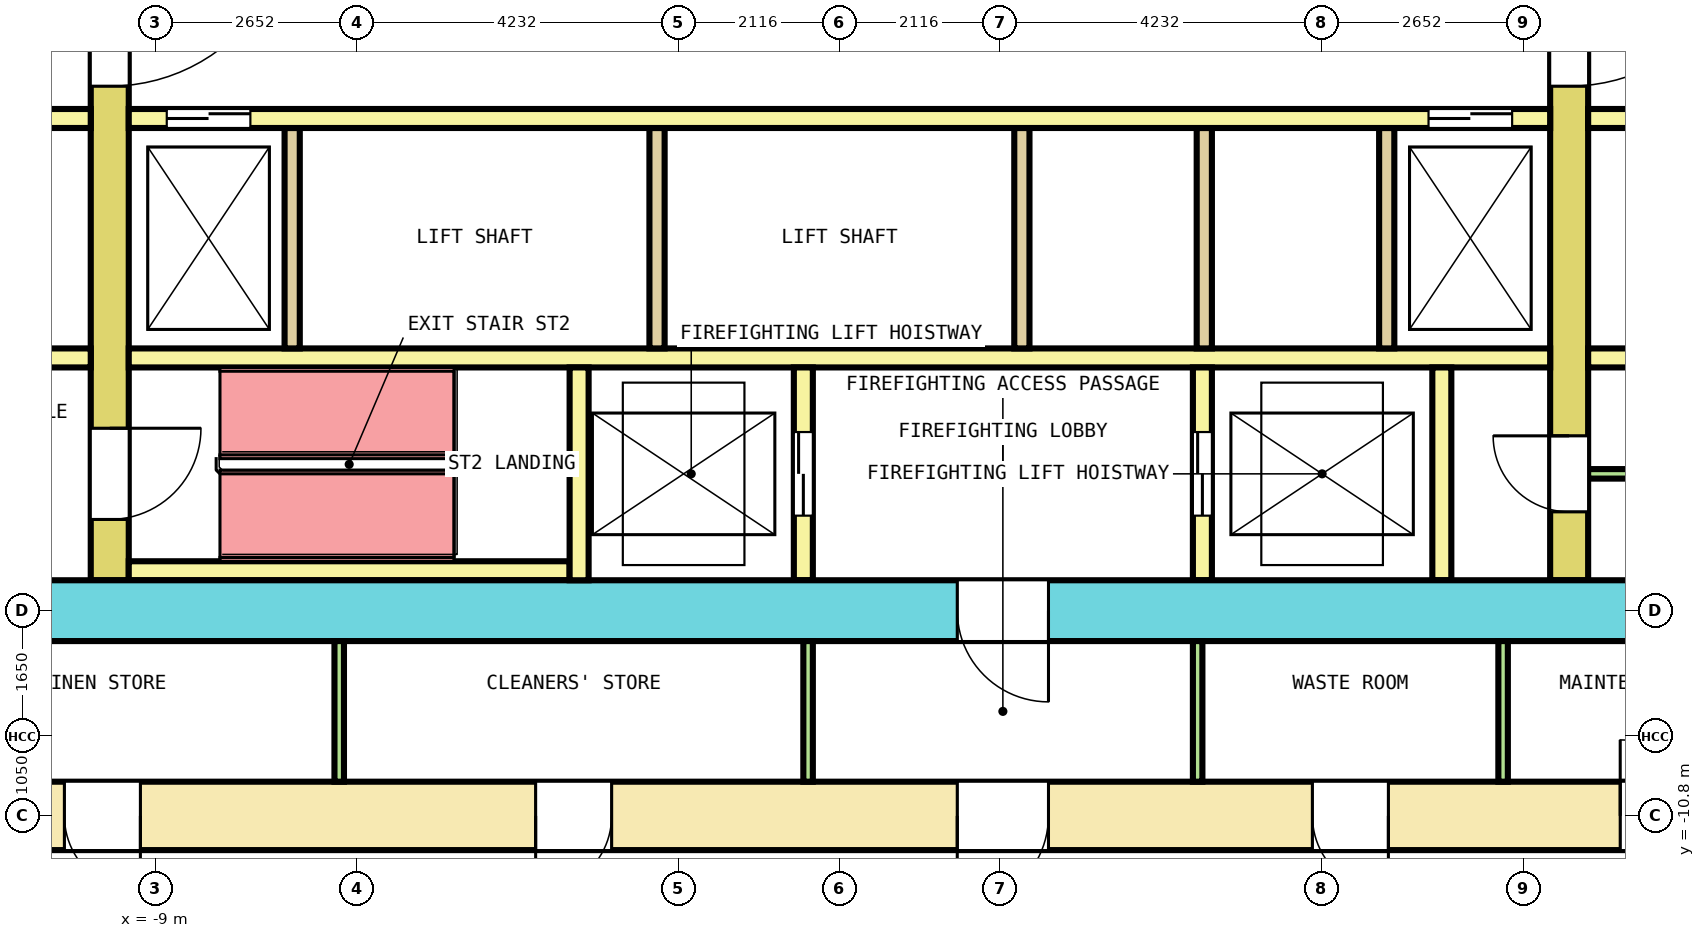
"""IFC4 building model, lengths in metres.
Left out: names, types, materials, properties, quantities, classifications, styles, units other than length and angle.
Written with IfcOpenShell. Run it as: python <this file> out.ifc"""

import sys

from ifc_helpers import new_model, si_unit, direction, frame, frame_2d, origin, place, context, subcontext, project, spatial, rectangle, extrude, element, fill, save


model = new_model("IFC4")
c1 = context("Model", 3, precision=1e-05, world=origin(), true_north=direction((0.0, 1.0)))
c2 = subcontext(c1, "Body", "Model", "MODEL_VIEW")
j1 = project(units=[si_unit("LENGTHUNIT", "METRE"), si_unit("PLANEANGLEUNIT", "RADIAN")], contexts=[c1])
p1 = place(None, origin())
s1 = spatial("IfcSite", under=j1, at=p1, CompositionType="ELEMENT")
p2 = place(p1, origin())
s2 = spatial("IfcBuilding", under=s1, at=p2, CompositionType="ELEMENT")
p3 = place(p2, frame((0.0, 0.0, 32.2)))
s3 = spatial("IfcBuildingStorey", under=s2, at=p3, CompositionType="ELEMENT", Elevation=32.2)
p4 = place(p3, frame((-13.65, -10.8, 0.0), z_axis=(0.0, 0.0, 1.0), x_axis=(1.0, 0.0, 0.0)))
e1 = element("IfcWall", 1, at=p4, inside=s3, PredefinedType="SHEAR", context=c2, shape_type="SweptSolid", body=[
    extrude(rectangle(XDim=27.3, YDim=0.9, at=frame_2d((13.65, 0.0))), origin(), (0.0, 0.0, 1.0), 4.1),
])
p5 = place(p4, frame((3.453, 0.0, 0.0)))
e2 = element("IfcOpeningElement", 2, at=p5, cuts=e1, PredefinedType="OPENING", context=c2, shape_type="SweptSolid", body=[
    extrude(rectangle(XDim=1.0, YDim=2.1, at=frame_2d((0.5, 1.05))), frame((0.0, 0.46, 0.0), z_axis=(0.0, -1.0, 0.0), x_axis=(1.0, 0.0, 0.0)), (0.0, 0.0, 1.0), 0.92),
])
p6 = place(p4, frame((9.653, 0.0, 0.0)))
e3 = element("IfcOpeningElement", 3, at=p6, cuts=e1, PredefinedType="OPENING", context=c2, shape_type="SweptSolid", body=[
    extrude(rectangle(XDim=1.0, YDim=2.1, at=frame_2d((0.5, 1.05))), frame((0.0, 0.46, 0.0), z_axis=(0.0, -1.0, 0.0), x_axis=(1.0, 0.0, 0.0)), (0.0, 0.0, 1.0), 0.92),
])
p7 = place(p4, frame((19.872, 0.0, 0.0)))
e4 = element("IfcOpeningElement", 4, at=p7, cuts=e1, PredefinedType="OPENING", context=c2, shape_type="SweptSolid", body=[
    extrude(rectangle(XDim=1.0, YDim=2.1, at=frame_2d((0.5, 1.05))), frame((0.0, 0.46, 0.0), z_axis=(0.0, -1.0, 0.0), x_axis=(1.0, 0.0, 0.0)), (0.0, 0.0, 1.0), 0.92),
])
p8 = place(p4, frame((23.922, 0.0, 0.0)))
e5 = element("IfcOpeningElement", 5, at=p8, cuts=e1, PredefinedType="OPENING", context=c2, shape_type="SweptSolid", body=[
    extrude(rectangle(XDim=1.0, YDim=2.1, at=frame_2d((0.5, 1.05))), frame((0.0, 0.46, 0.0), z_axis=(0.0, -1.0, 0.0), x_axis=(1.0, 0.0, 0.0)), (0.0, 0.0, 1.0), 0.92),
])
p9 = place(p4, frame((15.2, 0.0, 0.0)))
e6 = element("IfcOpeningElement", 6, at=p9, cuts=e1, PredefinedType="OPENING", context=c2, shape_type="SweptSolid", body=[
    extrude(rectangle(XDim=1.2, YDim=2.1, at=frame_2d((0.6, 1.05))), frame((0.0, 0.46, 0.0), z_axis=(0.0, -1.0, 0.0), x_axis=(1.0, 0.0, 0.0)), (0.0, 0.0, 1.0), 0.92),
])
p10 = place(p3, frame((-12.75, -8.1, 0.0), z_axis=(0.0, 0.0, 1.0), x_axis=(1.0, 0.0, 0.0)))
e7 = element("IfcWall", 7, at=p10, inside=s3, PredefinedType="SHEAR", context=c2, shape_type="SweptSolid", body=[
    extrude(rectangle(XDim=25.5, YDim=0.8, at=frame_2d((12.75, 0.0))), origin(), (0.0, 0.0, 1.0), 4.1),
])
p11 = place(p10, frame((14.3, 0.0, 0.0)))
e8 = element("IfcOpeningElement", 8, at=p11, cuts=e7, PredefinedType="OPENING", context=c2, shape_type="SweptSolid", body=[
    extrude(rectangle(XDim=1.2, YDim=2.1, at=frame_2d((0.6, 1.05))), frame((0.0, 0.41, 0.0), z_axis=(0.0, -1.0, 0.0), x_axis=(1.0, 0.0, 0.0)), (0.0, 0.0, 1.0), 0.82),
])
p12 = place(p3, frame((-9.6, -7.7, 0.0), z_axis=(0.0, 0.0, 1.0), x_axis=(0.0, 1.0, 0.0)))
e9 = element("IfcWall", 9, at=p12, inside=s3, PredefinedType="SHEAR", context=c2, shape_type="SweptSolid", body=[
    extrude(rectangle(XDim=15.4, YDim=0.5, at=frame_2d((7.7, 0.0))), origin(), (0.0, 0.0, 1.0), 4.1),
])
p13 = place(p12, frame((6.5, 0.0, 0.0)))
e10 = element("IfcOpeningElement", 10, at=p13, cuts=e9, PredefinedType="OPENING", context=c2, shape_type="SweptSolid", body=[
    extrude(rectangle(XDim=2.4, YDim=2.1, at=frame_2d((1.2, 1.05))), frame((0.0, 0.26, 0.0), z_axis=(0.0, -1.0, 0.0), x_axis=(1.0, 0.0, 0.0)), (0.0, 0.0, 1.0), 0.52),
])
p14 = place(p12, frame((13.4, 0.0, 0.0)))
e11 = element("IfcOpeningElement", 11, at=p14, cuts=e9, PredefinedType="OPENING", context=c2, shape_type="SweptSolid", body=[
    extrude(rectangle(XDim=1.2, YDim=2.1, at=frame_2d((0.6, 1.05))), frame((0.0, 0.26, 0.0), z_axis=(0.0, -1.0, 0.0), x_axis=(1.0, 0.0, 0.0)), (0.0, 0.0, 1.0), 0.52),
])
p15 = place(p12, frame((0.8, 0.0, 0.0)))
e12 = element("IfcOpeningElement", 12, at=p15, cuts=e9, PredefinedType="OPENING", context=c2, shape_type="SweptSolid", body=[
    extrude(rectangle(XDim=1.2, YDim=2.1, at=frame_2d((0.6, 1.05))), frame((0.0, 0.26, 0.0), z_axis=(0.0, -1.0, 0.0), x_axis=(1.0, 0.0, 0.0)), (0.0, 0.0, 1.0), 0.52),
])
p16 = place(p3, frame((9.6, -7.7, 0.0), z_axis=(0.0, 0.0, 1.0), x_axis=(0.0, 1.0, 0.0)))
e13 = element("IfcWall", 13, at=p16, inside=s3, PredefinedType="SHEAR", context=c2, shape_type="SweptSolid", body=[
    extrude(rectangle(XDim=15.4, YDim=0.5, at=frame_2d((7.7, 0.0))), origin(), (0.0, 0.0, 1.0), 4.1),
])
p17 = place(p16, frame((6.5, 0.0, 0.0)))
e14 = element("IfcOpeningElement", 14, at=p17, cuts=e13, PredefinedType="OPENING", context=c2, shape_type="SweptSolid", body=[
    extrude(rectangle(XDim=2.4, YDim=2.1, at=frame_2d((1.2, 1.05))), frame((0.0, 0.26, 0.0), z_axis=(0.0, -1.0, 0.0), x_axis=(1.0, 0.0, 0.0)), (0.0, 0.0, 1.0), 0.52),
])
p18 = place(p16, frame((13.4, 0.0, 0.0)))
e15 = element("IfcOpeningElement", 15, at=p18, cuts=e13, PredefinedType="OPENING", context=c2, shape_type="SweptSolid", body=[
    extrude(rectangle(XDim=1.2, YDim=2.1, at=frame_2d((0.6, 1.05))), frame((0.0, 0.26, 0.0), z_axis=(0.0, -1.0, 0.0), x_axis=(1.0, 0.0, 0.0)), (0.0, 0.0, 1.0), 0.52),
])
p19 = place(p16, frame((0.9, 0.0, 0.0)))
e16 = element("IfcOpeningElement", 16, at=p19, cuts=e13, PredefinedType="OPENING", context=c2, shape_type="SweptSolid", body=[
    extrude(rectangle(XDim=1.0, YDim=2.1, at=frame_2d((0.5, 1.05))), frame((0.0, 0.26, 0.0), z_axis=(0.0, -1.0, 0.0), x_axis=(1.0, 0.0, 0.0)), (0.0, 0.0, 1.0), 0.52),
])
p20 = place(p3, frame((-12.75, -1.625, 0.0), z_axis=(0.0, 0.0, 1.0), x_axis=(1.0, 0.0, 0.0)))
e17 = element("IfcWall", 17, at=p20, inside=s3, PredefinedType="SOLIDWALL", context=c2, shape_type="SweptSolid", body=[
    extrude(rectangle(XDim=2.9, YDim=0.25, at=frame_2d((1.45, 0.0))), origin(), (0.0, 0.0, 1.0), 4.1),
])
p21 = place(p20, frame((0.9, 0.0, 0.0)))
e18 = element("IfcOpeningElement", 18, at=p21, cuts=e17, PredefinedType="OPENING", context=c2, shape_type="SweptSolid", body=[
    extrude(rectangle(XDim=1.1, YDim=2.1, at=frame_2d((0.55, 1.05))), frame((0.0, 0.135, 0.0), z_axis=(0.0, -1.0, 0.0), x_axis=(1.0, 0.0, 0.0)), (0.0, 0.0, 1.0), 0.27),
])
p22 = place(p3, frame((-9.35, -1.625, 0.0), z_axis=(0.0, 0.0, 1.0), x_axis=(1.0, 0.0, 0.0)))
e19 = element("IfcWall", 19, at=p22, inside=s3, PredefinedType="SOLIDWALL", context=c2, shape_type="SweptSolid", body=[
    extrude(rectangle(XDim=18.7, YDim=0.25, at=frame_2d((9.35, 0.0))), origin(), (0.0, 0.0, 1.0), 4.1),
])
p23 = place(p22, frame((0.5, 0.0, 0.0)))
e20 = element("IfcOpeningElement", 20, at=p23, cuts=e19, PredefinedType="OPENING", context=c2, shape_type="SweptSolid", body=[
    extrude(rectangle(XDim=1.1, YDim=2.1, at=frame_2d((0.55, 1.05))), frame((0.0, 0.135, 0.0), z_axis=(0.0, -1.0, 0.0), x_axis=(1.0, 0.0, 0.0)), (0.0, 0.0, 1.0), 0.27),
])
p24 = place(p22, frame((17.1, 0.0, 0.0)))
e21 = element("IfcOpeningElement", 21, at=p24, cuts=e19, PredefinedType="OPENING", context=c2, shape_type="SweptSolid", body=[
    extrude(rectangle(XDim=1.1, YDim=2.1, at=frame_2d((0.55, 1.05))), frame((0.0, 0.135, 0.0), z_axis=(0.0, -1.0, 0.0), x_axis=(1.0, 0.0, 0.0)), (0.0, 0.0, 1.0), 0.27),
])
p25 = place(p3, frame((9.85, -1.625, 0.0), z_axis=(0.0, 0.0, 1.0), x_axis=(1.0, 0.0, 0.0)))
e22 = element("IfcWall", 22, at=p25, inside=s3, PredefinedType="SOLIDWALL", context=c2, shape_type="SweptSolid", body=[
    extrude(rectangle(XDim=2.9, YDim=0.25, at=frame_2d((1.45, 0.0))), origin(), (0.0, 0.0, 1.0), 4.1),
])
p26 = place(p25, frame((0.9, 0.0, 0.0)))
e23 = element("IfcOpeningElement", 23, at=p26, cuts=e22, PredefinedType="OPENING", context=c2, shape_type="SweptSolid", body=[
    extrude(rectangle(XDim=1.1, YDim=2.1, at=frame_2d((0.55, 1.05))), frame((0.0, 0.135, 0.0), z_axis=(0.0, -1.0, 0.0), x_axis=(1.0, 0.0, 0.0)), (0.0, 0.0, 1.0), 0.27),
])
p27 = place(p3, frame((-12.75, -4.775, 0.0), z_axis=(0.0, 0.0, 1.0), x_axis=(1.0, 0.0, 0.0)))
e24 = element("IfcWall", 24, at=p27, inside=s3, PredefinedType="SOLIDWALL", context=c2, shape_type="SweptSolid", body=[
    extrude(rectangle(XDim=2.9, YDim=0.25, at=frame_2d((1.45, 0.0))), origin(), (0.0, 0.0, 1.0), 4.1),
])
p28 = place(p3, frame((-9.35, -4.775, 0.0), z_axis=(0.0, 0.0, 1.0), x_axis=(1.0, 0.0, 0.0)))
e25 = element("IfcWall", 25, at=p28, inside=s3, PredefinedType="SOLIDWALL", context=c2, shape_type="SweptSolid", body=[
    extrude(rectangle(XDim=18.7, YDim=0.25, at=frame_2d((9.35, 0.0))), origin(), (0.0, 0.0, 1.0), 4.1),
])
p29 = place(p3, frame((9.85, -4.775, 0.0), z_axis=(0.0, 0.0, 1.0), x_axis=(1.0, 0.0, 0.0)))
e26 = element("IfcWall", 26, at=p29, inside=s3, PredefinedType="SOLIDWALL", context=c2, shape_type="SweptSolid", body=[
    extrude(rectangle(XDim=2.9, YDim=0.25, at=frame_2d((1.45, 0.0))), origin(), (0.0, 0.0, 1.0), 4.1),
])
for number, where, z_axis, x_axis in (
    (27, (-7.2, -4.65, 0.0), (0.0, 0.0, 1.0), (0.0, 1.0, 0.0)),
    (28, (-2.4, -4.65, 0.0), (0.0, 0.0, 1.0), (0.0, 1.0, 0.0)),
    (29, (2.4, -4.65, 0.0), (0.0, 0.0, 1.0), (0.0, 1.0, 0.0)),
    (30, (4.8, -4.65, 0.0), (0.0, 0.0, 1.0), (0.0, 1.0, 0.0)),
    (31, (7.2, -4.65, 0.0), (0.0, 0.0, 1.0), (0.0, 1.0, 0.0)),
):
    element("IfcWall", number, at=place(p3, frame(where, z_axis=z_axis, x_axis=x_axis)), inside=s3, PredefinedType="SOLIDWALL", context=c2, shape_type="SweptSolid", body=[
        extrude(rectangle(XDim=2.9, YDim=0.2, at=frame_2d((1.45, 0.0))), origin(), (0.0, 0.0, 1.0), 4.1),
    ])
p30 = place(p3, frame((-9.35, -7.575, 0.0), z_axis=(0.0, 0.0, 1.0), x_axis=(1.0, 0.0, 0.0)))
e32 = element("IfcWall", 32, at=p30, inside=s3, PredefinedType="SOLIDWALL", context=c2, shape_type="SweptSolid", body=[
    extrude(rectangle(XDim=5.8, YDim=0.25, at=frame_2d((2.9, 0.0))), origin(), (0.0, 0.0, 1.0), 4.1),
])
p31 = place(p3, frame((-3.425, -7.7, 0.0), z_axis=(0.0, 0.0, 1.0), x_axis=(0.0, 1.0, 0.0)))
e33 = element("IfcWall", 33, at=p31, inside=s3, PredefinedType="SOLIDWALL", context=c2, shape_type="SweptSolid", body=[
    extrude(rectangle(XDim=2.8, YDim=0.25, at=frame_2d((1.4, 0.0))), origin(), (0.0, 0.0, 1.0), 4.1),
])
p32 = place(p3, frame((-0.475, -7.7, 0.0), z_axis=(0.0, 0.0, 1.0), x_axis=(0.0, 1.0, 0.0)))
e34 = element("IfcWall", 34, at=p32, inside=s3, PredefinedType="SOLIDWALL", context=c2, shape_type="SweptSolid", body=[
    extrude(rectangle(XDim=2.8, YDim=0.25, at=frame_2d((1.4, 0.0))), origin(), (0.0, 0.0, 1.0), 4.1),
])
p33 = place(p32, frame((0.85, 0.0, 0.0)))
e35 = element("IfcOpeningElement", 35, at=p33, cuts=e34, PredefinedType="OPENING", context=c2, shape_type="SweptSolid", body=[
    extrude(rectangle(XDim=1.1, YDim=2.1, at=frame_2d((0.55, 1.05))), frame((0.0, 0.135, 0.0), z_axis=(0.0, -1.0, 0.0), x_axis=(1.0, 0.0, 0.0)), (0.0, 0.0, 1.0), 0.27),
])
p34 = place(p3, frame((4.775, -7.7, 0.0), z_axis=(0.0, 0.0, 1.0), x_axis=(0.0, 1.0, 0.0)))
e36 = element("IfcWall", 36, at=p34, inside=s3, PredefinedType="SOLIDWALL", context=c2, shape_type="SweptSolid", body=[
    extrude(rectangle(XDim=2.8, YDim=0.25, at=frame_2d((1.4, 0.0))), origin(), (0.0, 0.0, 1.0), 4.1),
])
p35 = place(p34, frame((0.85, 0.0, 0.0)))
e37 = element("IfcOpeningElement", 37, at=p35, cuts=e36, PredefinedType="OPENING", context=c2, shape_type="SweptSolid", body=[
    extrude(rectangle(XDim=1.1, YDim=2.1, at=frame_2d((0.55, 1.05))), frame((0.0, 0.135, 0.0), z_axis=(0.0, -1.0, 0.0), x_axis=(1.0, 0.0, 0.0)), (0.0, 0.0, 1.0), 0.27),
])
p36 = place(p3, frame((7.925, -7.7, 0.0), z_axis=(0.0, 0.0, 1.0), x_axis=(0.0, 1.0, 0.0)))
e38 = element("IfcWall", 38, at=p36, inside=s3, PredefinedType="SOLIDWALL", context=c2, shape_type="SweptSolid", body=[
    extrude(rectangle(XDim=2.8, YDim=0.25, at=frame_2d((1.4, 0.0))), origin(), (0.0, 0.0, 1.0), 4.1),
])
p37 = place(p3, frame((9.85, -6.3, 0.0), z_axis=(0.0, 0.0, 1.0), x_axis=(1.0, 0.0, 0.0)))
e39 = element("IfcWall", 39, at=p37, inside=s3, PredefinedType="PARTITIONING", context=c2, shape_type="SweptSolid", body=[
    extrude(rectangle(XDim=2.9, YDim=0.125, at=frame_2d((1.45, 0.0))), origin(), (0.0, 0.0, 1.0), 4.1),
])
for number, where, z_axis, x_axis in (
    (40, (-6.581, -10.35, 0.0), (0.0, 0.0, 1.0), (0.0, 1.0, 0.0)),
    (41, (-0.413, -10.35, 0.0), (0.0, 0.0, 1.0), (0.0, 1.0, 0.0)),
    (42, (4.712, -10.35, 0.0), (0.0, 0.0, 1.0), (0.0, 1.0, 0.0)),
    (43, (8.731, -10.35, 0.0), (0.0, 0.0, 1.0), (0.0, 1.0, 0.0)),
):
    element("IfcWall", number, at=place(p3, frame(where, z_axis=z_axis, x_axis=x_axis)), inside=s3, PredefinedType="PARTITIONING", context=c2, shape_type="SweptSolid", body=[
        extrude(rectangle(XDim=1.85, YDim=0.125, at=frame_2d((0.925, 0.0))), origin(), (0.0, 0.0, 1.0), 4.1),
    ])
p38 = place(p23, origin())
e44 = element("IfcDoor", 44, at=p38, inside=s3, OperationType="DOUBLE_DOOR_SLIDING", PredefinedType="DOOR", context=c2, shape_type="SweptSolid", body=[
    extrude(rectangle(XDim=1.1, YDim=2.1, at=frame_2d((0.55, 1.05))), frame((0.0, 0.075, 0.0), z_axis=(0.0, -1.0, 0.0), x_axis=(1.0, 0.0, 0.0)), (0.0, 0.0, 1.0), 0.15),
])
fill(e20, e44)
p39 = place(p24, origin())
e45 = element("IfcDoor", 45, at=p39, inside=s3, OperationType="DOUBLE_DOOR_SLIDING", PredefinedType="DOOR", context=c2, shape_type="SweptSolid", body=[
    extrude(rectangle(XDim=1.1, YDim=2.1, at=frame_2d((0.55, 1.05))), frame((0.0, 0.075, 0.0), z_axis=(0.0, -1.0, 0.0), x_axis=(1.0, 0.0, 0.0)), (0.0, 0.0, 1.0), 0.15),
])
fill(e21, e45)
p40 = place(p33, origin())
e46 = element("IfcDoor", 46, at=p40, inside=s3, OperationType="DOUBLE_DOOR_SLIDING", PredefinedType="DOOR", context=c2, shape_type="SweptSolid", body=[
    extrude(rectangle(XDim=1.1, YDim=2.1, at=frame_2d((0.55, 1.05))), frame((0.0, 0.075, 0.0), z_axis=(0.0, -1.0, 0.0), x_axis=(1.0, 0.0, 0.0)), (0.0, 0.0, 1.0), 0.15),
])
fill(e35, e46)
p41 = place(p35, origin())
e47 = element("IfcDoor", 47, at=p41, inside=s3, OperationType="DOUBLE_DOOR_SLIDING", PredefinedType="DOOR", context=c2, shape_type="SweptSolid", body=[
    extrude(rectangle(XDim=1.1, YDim=2.1, at=frame_2d((0.55, 1.05))), frame((0.0, 0.075, 0.0), z_axis=(0.0, -1.0, 0.0), x_axis=(1.0, 0.0, 0.0)), (0.0, 0.0, 1.0), 0.15),
])
fill(e37, e47)
p42 = place(p13, origin())
e48 = element("IfcDoor", 48, at=p42, inside=s3, OperationType="DOUBLE_DOOR_SINGLE_SWING", PredefinedType="DOOR", context=c2, shape_type="SweptSolid", body=[
    extrude(rectangle(XDim=2.4, YDim=2.1, at=frame_2d((1.2, 1.05))), frame((0.0, 0.2, 0.0), z_axis=(0.0, -1.0, 0.0), x_axis=(1.0, 0.0, 0.0)), (0.0, 0.0, 1.0), 0.4),
])
fill(e10, e48)
p43 = place(p17, origin())
e49 = element("IfcDoor", 49, at=p43, inside=s3, OperationType="DOUBLE_DOOR_SINGLE_SWING", PredefinedType="DOOR", context=c2, shape_type="SweptSolid", body=[
    extrude(rectangle(XDim=2.4, YDim=2.1, at=frame_2d((1.2, 1.05))), frame((0.0, 0.2, 0.0), z_axis=(0.0, -1.0, 0.0), x_axis=(1.0, 0.0, 0.0)), (0.0, 0.0, 1.0), 0.4),
])
fill(e14, e49)
p44 = place(p15, origin())
e50 = element("IfcDoor", 50, at=p44, inside=s3, OperationType="SINGLE_SWING_RIGHT", PredefinedType="DOOR", context=c2, shape_type="SweptSolid", body=[
    extrude(rectangle(XDim=1.2, YDim=2.1, at=frame_2d((0.6, 1.05))), frame((0.0, 0.2, 0.0), z_axis=(0.0, -1.0, 0.0), x_axis=(1.0, 0.0, 0.0)), (0.0, 0.0, 1.0), 0.4),
])
fill(e12, e50)
p45 = place(p11, origin())
e51 = element("IfcDoor", 51, at=p45, inside=s3, OperationType="SINGLE_SWING_RIGHT", PredefinedType="DOOR", context=c2, shape_type="SweptSolid", body=[
    extrude(rectangle(XDim=1.2, YDim=2.1, at=frame_2d((0.6, 1.05))), frame((0.0, 0.3, 0.0), z_axis=(0.0, -1.0, 0.0), x_axis=(1.0, 0.0, 0.0)), (0.0, 0.0, 1.0), 0.6),
])
fill(e8, e51)
p46 = place(p19, origin())
e52 = element("IfcDoor", 52, at=p46, inside=s3, OperationType="SINGLE_SWING_RIGHT", PredefinedType="DOOR", context=c2, shape_type="SweptSolid", body=[
    extrude(rectangle(XDim=1.0, YDim=2.1, at=frame_2d((0.5, 1.05))), frame((0.0, 0.2, 0.0), z_axis=(0.0, -1.0, 0.0), x_axis=(1.0, 0.0, 0.0)), (0.0, 0.0, 1.0), 0.4),
])
fill(e16, e52)
p47 = place(p5, origin())
e53 = element("IfcDoor", 53, at=p47, inside=s3, OperationType="SINGLE_SWING_LEFT", PredefinedType="DOOR", context=c2, shape_type="SweptSolid", body=[
    extrude(rectangle(XDim=1.0, YDim=2.1, at=frame_2d((0.5, 1.05))), frame((0.0, 0.3, 0.0), z_axis=(0.0, -1.0, 0.0), x_axis=(1.0, 0.0, 0.0)), (0.0, 0.0, 1.0), 0.6),
])
fill(e2, e53)
p48 = place(p6, origin())
e54 = element("IfcDoor", 54, at=p48, inside=s3, OperationType="SINGLE_SWING_RIGHT", PredefinedType="DOOR", context=c2, shape_type="SweptSolid", body=[
    extrude(rectangle(XDim=1.0, YDim=2.1, at=frame_2d((0.5, 1.05))), frame((0.0, 0.3, 0.0), z_axis=(0.0, -1.0, 0.0), x_axis=(1.0, 0.0, 0.0)), (0.0, 0.0, 1.0), 0.6),
])
fill(e3, e54)
p49 = place(p7, origin())
e55 = element("IfcDoor", 55, at=p49, inside=s3, OperationType="SINGLE_SWING_LEFT", PredefinedType="DOOR", context=c2, shape_type="SweptSolid", body=[
    extrude(rectangle(XDim=1.0, YDim=2.1, at=frame_2d((0.5, 1.05))), frame((0.0, 0.3, 0.0), z_axis=(0.0, -1.0, 0.0), x_axis=(1.0, 0.0, 0.0)), (0.0, 0.0, 1.0), 0.6),
])
fill(e4, e55)
p50 = place(p8, origin())
e56 = element("IfcDoor", 56, at=p50, inside=s3, OperationType="SINGLE_SWING_RIGHT", PredefinedType="DOOR", context=c2, shape_type="SweptSolid", body=[
    extrude(rectangle(XDim=1.0, YDim=2.1, at=frame_2d((0.5, 1.05))), frame((0.0, 0.3, 0.0), z_axis=(0.0, -1.0, 0.0), x_axis=(1.0, 0.0, 0.0)), (0.0, 0.0, 1.0), 0.6),
])
fill(e5, e56)
p51 = place(p9, origin())
e57 = element("IfcDoor", 57, at=p51, inside=s3, OperationType="SINGLE_SWING_LEFT", PredefinedType="DOOR", context=c2, shape_type="SweptSolid", body=[
    extrude(rectangle(XDim=1.2, YDim=2.1, at=frame_2d((0.6, 1.05))), frame((0.0, 0.3, 0.0), z_axis=(0.0, -1.0, 0.0), x_axis=(1.0, 0.0, 0.0)), (0.0, 0.0, 1.0), 0.6),
])
fill(e6, e57)
save(model, sys.argv[1])
